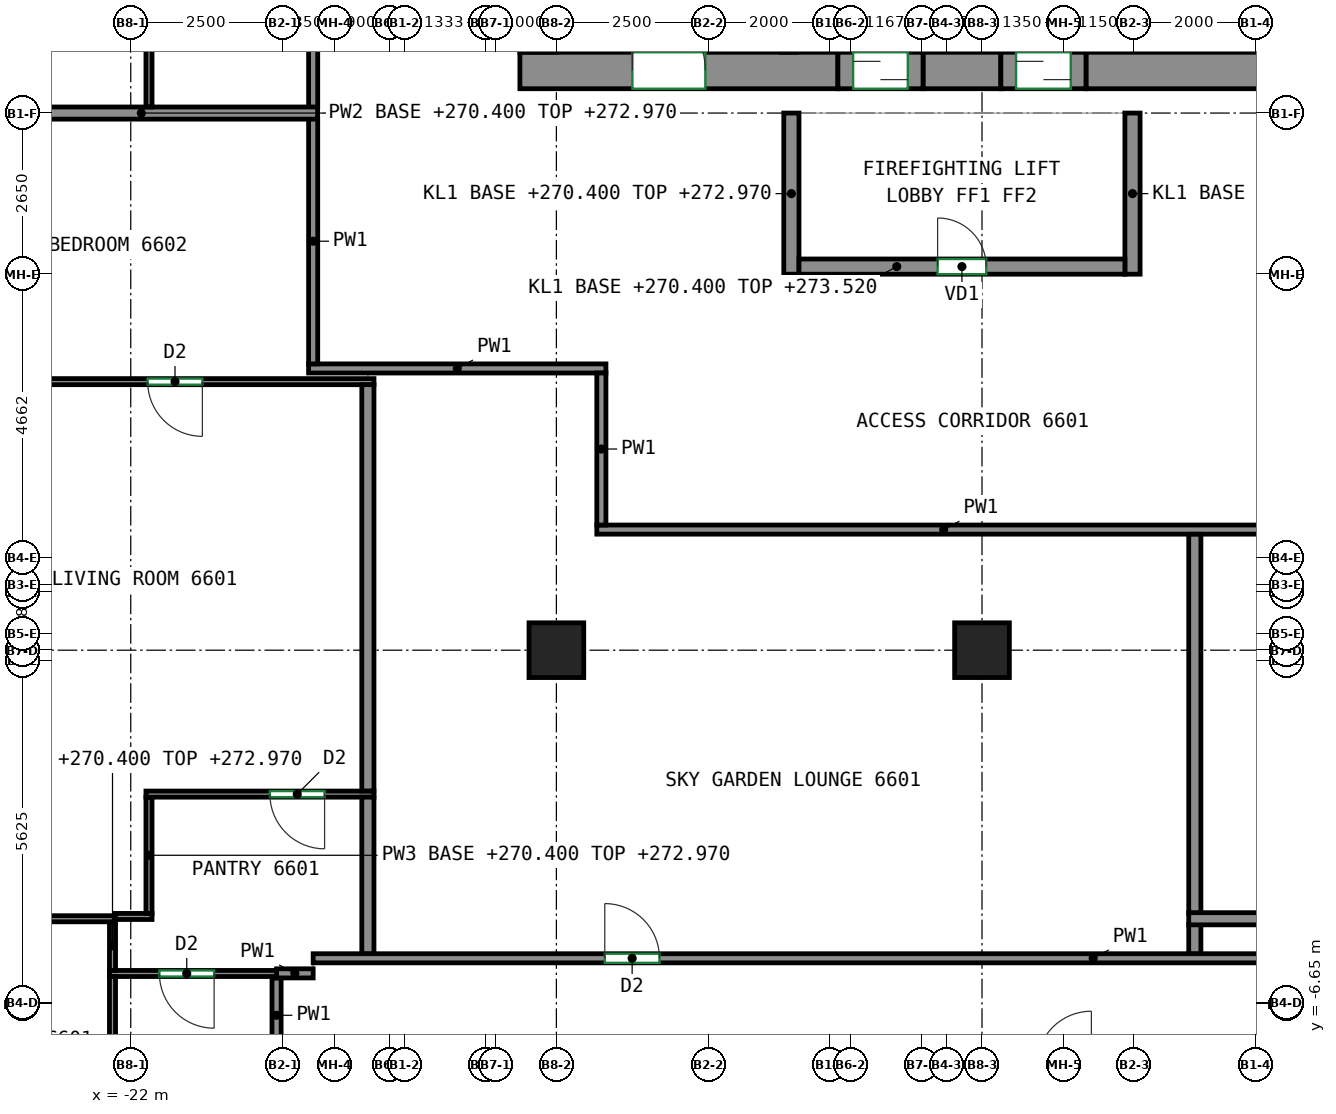
"""IFC4 building model, lengths in metres.
Left out: names, types, materials, properties, quantities, classifications, styles, units other than length and angle.
Written with IfcOpenShell. Run it as: python <this file> out.ifc"""

import sys

from ifc_helpers import new_model, si_unit, direction, frame, frame_2d, origin, origin_2d, place, context, subcontext, project, spatial, rectangle, extrude, source, transform, mapped, element, fill, save


model = new_model("IFC4")
c1 = context("Model", 3, precision=1e-05, world=origin(), true_north=direction((0.0, 1.0)))
c2 = subcontext(c1, "Body", "Model", "MODEL_VIEW")
j1 = project(units=[si_unit("LENGTHUNIT", "METRE"), si_unit("PLANEANGLEUNIT", "RADIAN")], contexts=[c1])
p1 = place(None, origin())
s1 = spatial("IfcSite", under=j1, at=p1, CompositionType="ELEMENT")
p2 = place(p1, origin())
s2 = spatial("IfcBuilding", under=s1, at=p2, CompositionType="ELEMENT")
p3 = place(p2, frame((0.0, 0.0, 270.4)))
s3 = spatial("IfcBuildingStorey", under=s2, at=p3, CompositionType="ELEMENT", Elevation=270.4)
m1 = source(origin(), c2, "Body", "SweptSolid", [
    extrude(rectangle(XDim=0.9, YDim=0.9, at=origin_2d()), origin(), (0.0, 0.0, 1.0), 3.12),
])
for number, where, z_axis, x_axis in (
    (1, (-15.0, -0.833, 0.0), (0.0, 0.0, 1.0), (1.0, 0.0, 0.0)),
    (2, (-8.0, -0.833, 0.0), (0.0, 0.0, 1.0), (1.0, 0.0, 0.0)),
):
    element("IfcColumn", number, at=place(p3, frame(where, z_axis=z_axis, x_axis=x_axis)), inside=s3, PredefinedType="COLUMN", context=c2, shape_type="MappedRepresentation", body=[
        mapped(m1, transform((0.0, 0.0, 0.0))),
    ])
m2 = source(origin(), c2, "Body", "SweptSolid", [
    extrude(rectangle(XDim=5.23, YDim=0.6, at=frame_2d((2.615, 0.0))), origin(), (0.0, 0.0, 1.0), 3.12),
])
p4 = place(p3, frame((-15.6, 8.7, 0.0), z_axis=(0.0, 0.0, 1.0), x_axis=(1.0, 0.0, 0.0)))
e3 = element("IfcWall", 3, at=p4, inside=s3, PredefinedType="SHEAR", context=c2, shape_type="MappedRepresentation", body=[
    mapped(m2, transform((0.0, 0.0, 0.0))),
])
p5 = place(p4, frame((1.85, 0.0, 0.0)))
e4 = element("IfcOpeningElement", 4, at=p5, cuts=e3, PredefinedType="OPENING", context=c2, shape_type="SweptSolid", body=[
    extrude(rectangle(XDim=1.2, YDim=2.1, at=frame_2d((0.6, 1.05))), frame((0.0, 0.31, 0.0), z_axis=(0.0, -1.0, 0.0), x_axis=(1.0, 0.0, 0.0)), (0.0, 0.0, 1.0), 0.62),
])
m3 = source(origin(), c2, "Body", "SweptSolid", [
    extrude(rectangle(XDim=1.28, YDim=0.6, at=frame_2d((0.64, 0.0))), origin(), (0.0, 0.0, 1.0), 3.12),
])
p6 = place(p3, frame((-8.97, 8.7, 0.0), z_axis=(0.0, 0.0, 1.0), x_axis=(1.0, 0.0, 0.0)))
e5 = element("IfcWall", 5, at=p6, inside=s3, PredefinedType="SHEAR", context=c2, shape_type="MappedRepresentation", body=[
    mapped(m3, transform((0.0, 0.0, 0.0))),
])
m4 = source(origin(), c2, "Body", "SweptSolid", [
    extrude(rectangle(XDim=14.18, YDim=0.6, at=frame_2d((7.09, 0.0))), origin(), (0.0, 0.0, 1.0), 3.12),
])
p7 = place(p3, frame((-6.29, 8.7, 0.0), z_axis=(0.0, 0.0, 1.0), x_axis=(1.0, 0.0, 0.0)))
e6 = element("IfcWall", 6, at=p7, inside=s3, PredefinedType="SHEAR", context=c2, shape_type="MappedRepresentation", body=[
    mapped(m4, transform((0.0, 0.0, 0.0))),
])
m5 = source(origin(), c2, "Body", "SweptSolid", [
    extrude(rectangle(XDim=2.65, YDim=0.25, at=frame_2d((1.325, 0.0))), origin(), (0.0, 0.0, 1.0), 2.57),
])
for number, where, z_axis, x_axis in (
    (7, (-11.135, 5.35, 0.0), (0.0, 0.0, 1.0), (0.0, 1.0, 0.0)),
    (8, (-5.525, 5.35, 0.0), (0.0, 0.0, 1.0), (0.0, 1.0, 0.0)),
):
    element("IfcWall", number, at=place(p3, frame(where, z_axis=z_axis, x_axis=x_axis)), inside=s3, PredefinedType="PARTITIONING", context=c2, shape_type="MappedRepresentation", body=[
        mapped(m5, transform((0.0, 0.0, 0.0))),
    ])
m6 = source(origin(), c2, "Body", "SweptSolid", [
    extrude(rectangle(XDim=5.36, YDim=0.25, at=frame_2d((2.68, 0.0))), origin(), (0.0, 0.0, 1.0), 3.12),
])
p8 = place(p3, frame((-11.01, 5.475, 0.0), z_axis=(0.0, 0.0, 1.0), x_axis=(1.0, 0.0, 0.0)))
e9 = element("IfcWall", 9, at=p8, inside=s3, PredefinedType="PARTITIONING", context=c2, shape_type="MappedRepresentation", body=[
    mapped(m6, transform((0.0, 0.0, 0.0))),
])
p9 = place(p8, frame((2.28, 0.0, 0.0)))
e10 = element("IfcOpeningElement", 10, at=p9, cuts=e9, PredefinedType="OPENING", context=c2, shape_type="SweptSolid", body=[
    extrude(rectangle(XDim=0.8, YDim=2.0, at=frame_2d((0.4, 1.0))), frame((0.0, 0.135, 0.0), z_axis=(0.0, -1.0, 0.0), x_axis=(1.0, 0.0, 0.0)), (0.0, 0.0, 1.0), 0.27),
])
m7 = source(origin(), c2, "Body", "SweptSolid", [
    extrude(rectangle(XDim=1.4, YDim=0.6, at=frame_2d((0.7, 0.0))), origin(), (0.0, 0.0, 1.0), 2.7),
])
p10 = place(p3, frame((-10.37, 8.7, 0.0), z_axis=(0.0, 0.0, 1.0), x_axis=(1.0, 0.0, 0.0)))
e11 = element("IfcWall", 11, at=p10, inside=s3, PredefinedType="PARTITIONING", context=c2, shape_type="MappedRepresentation", body=[
    mapped(m7, transform((0.0, 0.0, 0.0))),
])
p11 = place(p10, frame((0.25, 0.0, 0.0)))
e12 = element("IfcOpeningElement", 12, at=p11, cuts=e11, PredefinedType="OPENING", context=c2, shape_type="SweptSolid", body=[
    extrude(rectangle(XDim=0.9, YDim=2.1, at=frame_2d((0.45, 1.05))), frame((0.0, 0.31, 0.0), z_axis=(0.0, -1.0, 0.0), x_axis=(1.0, 0.0, 0.0)), (0.0, 0.0, 1.0), 0.62),
])
m8 = source(origin(), c2, "Body", "SweptSolid", [
    extrude(rectangle(XDim=1.4, YDim=0.6, at=frame_2d((0.7, 0.0))), origin(), (0.0, 0.0, 1.0), 2.7),
])
p12 = place(p3, frame((-7.69, 8.7, 0.0), z_axis=(0.0, 0.0, 1.0), x_axis=(1.0, 0.0, 0.0)))
e13 = element("IfcWall", 13, at=p12, inside=s3, PredefinedType="PARTITIONING", context=c2, shape_type="MappedRepresentation", body=[
    mapped(m8, transform((0.0, 0.0, 0.0))),
])
p13 = place(p12, frame((0.25, 0.0, 0.0)))
e14 = element("IfcOpeningElement", 14, at=p13, cuts=e13, PredefinedType="OPENING", context=c2, shape_type="SweptSolid", body=[
    extrude(rectangle(XDim=0.9, YDim=2.1, at=frame_2d((0.45, 1.05))), frame((0.0, 0.31, 0.0), z_axis=(0.0, -1.0, 0.0), x_axis=(1.0, 0.0, 0.0)), (0.0, 0.0, 1.0), 0.62),
])
p14 = place(p3, frame((-19.602, -7.452, 0.0), z_axis=(0.0, 0.0, 1.0), x_axis=(0.0, 1.0, 0.0)))
e15 = element("IfcWall", 15, at=p14, inside=s3, PredefinedType="PARTITIONING", context=c2, shape_type="SweptSolid", body=[
    extrude(rectangle(XDim=1.229, YDim=0.15, at=frame_2d((0.615, 0.0))), origin(), (0.0, 0.0, 1.0), 3.12),
])
p15 = place(p3, frame((-19.0, -6.148, 0.0), z_axis=(0.0, 0.0, 1.0), x_axis=(-1.0, 0.0, 0.0)))
e16 = element("IfcWall", 16, at=p15, inside=s3, PredefinedType="PARTITIONING", context=c2, shape_type="SweptSolid", body=[
    extrude(rectangle(XDim=0.602, YDim=0.15, at=frame_2d((0.301, 0.0))), origin(), (0.0, 0.0, 1.0), 3.12),
])
p16 = place(p3, frame((-19.0, -5.9, 0.0), z_axis=(0.0, 0.0, 1.0), x_axis=(1.0, 0.0, 0.0)))
e17 = element("IfcWall", 17, at=p16, inside=s3, PredefinedType="PARTITIONING", context=c2, shape_type="SweptSolid", body=[
    extrude(rectangle(XDim=25.655, YDim=0.15, at=frame_2d((12.828, 0.0))), origin(), (0.0, 0.0, 1.0), 3.12),
])
p17 = place(p16, frame((4.796, 0.0, 0.0)))
e18 = element("IfcOpeningElement", 18, at=p17, cuts=e17, PredefinedType="OPENING", context=c2, shape_type="SweptSolid", body=[
    extrude(rectangle(XDim=0.9, YDim=2.1, at=frame_2d((0.45, 1.05))), frame((0.0, 0.085, 0.0), z_axis=(0.0, -1.0, 0.0), x_axis=(1.0, 0.0, 0.0)), (0.0, 0.0, 1.0), 0.17),
])
p18 = place(p16, frame((21.535, 0.0, 0.0)))
e19 = element("IfcOpeningElement", 19, at=p18, cuts=e17, PredefinedType="OPENING", context=c2, shape_type="SweptSolid", body=[
    extrude(rectangle(XDim=0.9, YDim=2.1, at=frame_2d((0.45, 1.05))), frame((0.0, 0.085, 0.0), z_axis=(0.0, -1.0, 0.0), x_axis=(1.0, 0.0, 0.0)), (0.0, 0.0, 1.0), 0.17),
])
p19 = place(p3, frame((-19.075, 3.8, 0.0), z_axis=(0.0, 0.0, 1.0), x_axis=(1.0, 0.0, 0.0)))
e20 = element("IfcWall", 20, at=p19, inside=s3, PredefinedType="PARTITIONING", context=c2, shape_type="SweptSolid", body=[
    extrude(rectangle(XDim=4.89, YDim=0.15, at=frame_2d((2.445, 0.0))), origin(), (0.0, 0.0, 1.0), 3.12),
])
p20 = place(p3, frame((-19.0, 3.875, 0.0), z_axis=(0.0, 0.0, 1.0), x_axis=(0.0, 1.0, 0.0)))
e21 = element("IfcWall", 21, at=p20, inside=s3, PredefinedType="PARTITIONING", context=c2, shape_type="SweptSolid", body=[
    extrude(rectangle(XDim=4.035, YDim=0.15, at=frame_2d((2.018, 0.0))), origin(), (0.0, 0.0, 1.0), 3.12),
])
p21 = place(p3, frame((-19.0, 8.09, 0.0), z_axis=(0.0, 0.0, 1.0), x_axis=(0.0, 1.0, 0.0)))
e22 = element("IfcWall", 22, at=p21, inside=s3, PredefinedType="PARTITIONING", context=c2, shape_type="SweptSolid", body=[
    extrude(rectangle(XDim=4.63, YDim=0.15, at=frame_2d((2.315, 0.0))), origin(), (0.0, 0.0, 1.0), 3.12),
])
p22 = place(p3, frame((-14.335, 1.15, 0.0), z_axis=(0.0, 0.0, 1.0), x_axis=(1.0, 0.0, 0.0)))
e23 = element("IfcWall", 23, at=p22, inside=s3, PredefinedType="PARTITIONING", context=c2, shape_type="SweptSolid", body=[
    extrude(rectangle(XDim=11.41, YDim=0.15, at=frame_2d((5.705, 0.0))), origin(), (0.0, 0.0, 1.0), 3.12),
])
p23 = place(p3, frame((-14.26, 3.725, 0.0), z_axis=(0.0, 0.0, 1.0), x_axis=(0.0, -1.0, 0.0)))
e24 = element("IfcWall", 24, at=p23, inside=s3, PredefinedType="PARTITIONING", context=c2, shape_type="SweptSolid", body=[
    extrude(rectangle(XDim=2.5, YDim=0.15, at=frame_2d((1.25, 0.0))), origin(), (0.0, 0.0, 1.0), 3.12),
])
p24 = place(p3, frame((-19.602, -6.15, 0.0), z_axis=(0.0, 0.0, 1.0), x_axis=(-1.0, 0.0, 0.0)))
e25 = element("IfcWall", 25, at=p24, inside=s3, PredefinedType="PARTITIONING", context=c2, shape_type="SweptSolid", body=[
    extrude(rectangle(XDim=2.748, YDim=0.1, at=frame_2d((1.374, 0.0))), origin(), (0.0, 0.0, 1.0), 3.12),
])
p25 = place(p24, frame((1.027, 0.0, 0.0)))
e26 = element("IfcOpeningElement", 26, at=p25, cuts=e25, PredefinedType="OPENING", context=c2, shape_type="SweptSolid", body=[
    extrude(rectangle(XDim=0.9, YDim=2.1, at=frame_2d((0.45, 1.05))), frame((0.0, 0.06, 0.0), z_axis=(0.0, -1.0, 0.0), x_axis=(1.0, 0.0, 0.0)), (0.0, 0.0, 1.0), 0.12),
])
p26 = place(p3, frame((-22.3, -9.05, 0.0), z_axis=(0.0, 0.0, 1.0), x_axis=(0.0, 1.0, 0.0)))
e27 = element("IfcWall", 27, at=p26, inside=s3, PredefinedType="PARTITIONING", context=c2, shape_type="SweptSolid", body=[
    extrude(rectangle(XDim=2.85, YDim=0.1, at=frame_2d((1.425, 0.0))), origin(), (0.0, 0.0, 1.0), 2.57),
])
p27 = place(p3, frame((-22.3, -6.1, 0.0), z_axis=(0.0, 0.0, 1.0), x_axis=(0.0, 1.0, 0.0)))
e28 = element("IfcWall", 28, at=p27, inside=s3, PredefinedType="PARTITIONING", context=c2, shape_type="SweptSolid", body=[
    extrude(rectangle(XDim=0.81, YDim=0.1, at=frame_2d((0.405, 0.0))), origin(), (0.0, 0.0, 1.0), 2.57),
])
p28 = place(p3, frame((-21.65, -5.212, 0.0), z_axis=(0.0, 0.0, 1.0), x_axis=(-1.0, 0.0, 0.0)))
e29 = element("IfcWall", 29, at=p28, inside=s3, PredefinedType="PARTITIONING", context=c2, shape_type="SweptSolid", body=[
    extrude(rectangle(XDim=0.602, YDim=0.1, at=frame_2d((0.301, 0.0))), origin(), (0.0, 0.0, 1.0), 3.12),
])
p29 = place(p3, frame((-21.7, -5.162, 0.0), z_axis=(0.0, 0.0, 1.0), x_axis=(0.0, 1.0, 0.0)))
e30 = element("IfcWall", 30, at=p29, inside=s3, PredefinedType="PARTITIONING", context=c2, shape_type="SweptSolid", body=[
    extrude(rectangle(XDim=1.912, YDim=0.1, at=frame_2d((0.956, 0.0))), origin(), (0.0, 0.0, 1.0), 2.57),
])
p30 = place(p3, frame((-18.0, -3.2, 0.0), z_axis=(0.0, 0.0, 1.0), x_axis=(-1.0, 0.0, 0.0)))
e31 = element("IfcWall", 31, at=p30, inside=s3, PredefinedType="PARTITIONING", context=c2, shape_type="SweptSolid", body=[
    extrude(rectangle(XDim=3.75, YDim=0.1, at=frame_2d((1.875, 0.0))), origin(), (0.0, 0.0, 1.0), 3.12),
])
p31 = place(p30, frame((0.812, 0.0, 0.0)))
e32 = element("IfcOpeningElement", 32, at=p31, cuts=e31, PredefinedType="OPENING", context=c2, shape_type="SweptSolid", body=[
    extrude(rectangle(XDim=0.9, YDim=2.1, at=frame_2d((0.45, 1.05))), frame((0.0, 0.06, 0.0), z_axis=(0.0, -1.0, 0.0), x_axis=(1.0, 0.0, 0.0)), (0.0, 0.0, 1.0), 0.12),
])
p32 = place(p3, frame((-18.1, -5.823, 0.0), z_axis=(0.0, 0.0, 1.0), x_axis=(0.0, 1.0, 0.0)))
e33 = element("IfcWall", 33, at=p32, inside=s3, PredefinedType="PARTITIONING", context=c2, shape_type="SweptSolid", body=[
    extrude(rectangle(XDim=2.573, YDim=0.2, at=frame_2d((1.287, 0.0))), origin(), (0.0, 0.0, 1.0), 3.12),
])
p33 = place(p3, frame((-22.252, -5.25, 0.0), z_axis=(0.0, 0.0, 1.0), x_axis=(-1.0, 0.0, 0.0)))
e34 = element("IfcWall", 34, at=p33, inside=s3, PredefinedType="PARTITIONING", context=c2, shape_type="SweptSolid", body=[
    extrude(rectangle(XDim=2.998, YDim=0.1, at=frame_2d((1.499, 0.0))), origin(), (0.0, 0.0, 1.0), 3.12),
])
p34 = place(p33, frame((1.898, 0.0, 0.0)))
e35 = element("IfcOpeningElement", 35, at=p34, cuts=e34, PredefinedType="OPENING", context=c2, shape_type="SweptSolid", body=[
    extrude(rectangle(XDim=0.9, YDim=2.1, at=frame_2d((0.45, 1.05))), frame((0.0, 0.06, 0.0), z_axis=(0.0, -1.0, 0.0), x_axis=(1.0, 0.0, 0.0)), (0.0, 0.0, 1.0), 0.12),
])
p35 = place(p3, frame((-18.0, 3.583, 0.0), z_axis=(0.0, 0.0, 1.0), x_axis=(-1.0, 0.0, 0.0)))
e36 = element("IfcWall", 36, at=p35, inside=s3, PredefinedType="PARTITIONING", context=c2, shape_type="SweptSolid", body=[
    extrude(rectangle(XDim=7.25, YDim=0.1, at=frame_2d((3.625, 0.0))), origin(), (0.0, 0.0, 1.0), 3.12),
])
p36 = place(p35, frame((2.822, 0.0, 0.0)))
e37 = element("IfcOpeningElement", 37, at=p36, cuts=e36, PredefinedType="OPENING", context=c2, shape_type="SweptSolid", body=[
    extrude(rectangle(XDim=0.9, YDim=2.1, at=frame_2d((0.45, 1.05))), frame((0.0, 0.06, 0.0), z_axis=(0.0, -1.0, 0.0), x_axis=(1.0, 0.0, 0.0)), (0.0, 0.0, 1.0), 0.12),
])
p37 = place(p3, frame((-18.1, -3.148, 0.0), z_axis=(0.0, 0.0, 1.0), x_axis=(0.0, 1.0, 0.0)))
e38 = element("IfcWall", 38, at=p37, inside=s3, PredefinedType="PARTITIONING", context=c2, shape_type="SweptSolid", body=[
    extrude(rectangle(XDim=6.681, YDim=0.2, at=frame_2d((3.34, 0.0))), origin(), (0.0, 0.0, 1.0), 3.12),
])
p38 = place(p3, frame((-24.725, 8.0, 0.0), z_axis=(0.0, 0.0, 1.0), x_axis=(1.0, 0.0, 0.0)))
e39 = element("IfcWall", 39, at=p38, inside=s3, PredefinedType="PARTITIONING", context=c2, shape_type="SweptSolid", body=[
    extrude(rectangle(XDim=5.798, YDim=0.2, at=frame_2d((2.899, 0.0))), origin(), (0.0, 0.0, 1.0), 2.57),
])
p39 = place(p3, frame((-21.7, 8.1, 0.0), z_axis=(0.0, 0.0, 1.0), x_axis=(0.0, 1.0, 0.0)))
e40 = element("IfcWall", 40, at=p39, inside=s3, PredefinedType="PARTITIONING", context=c2, shape_type="SweptSolid", body=[
    extrude(rectangle(XDim=2.619, YDim=0.1, at=frame_2d((1.31, 0.0))), origin(), (0.0, 0.0, 1.0), 2.57),
])
p40 = place(p3, frame((-4.5, -5.16, 0.0), z_axis=(0.0, 0.0, 1.0), x_axis=(0.0, 1.0, 0.0)))
e41 = element("IfcWall", 41, at=p40, inside=s3, PredefinedType="PARTITIONING", context=c2, shape_type="SweptSolid", body=[
    extrude(rectangle(XDim=6.233, YDim=0.2, at=frame_2d((3.116, 0.0))), origin(), (0.0, 0.0, 1.0), 3.12),
])
p41 = place(p3, frame((-4.5, -5.823, 0.0), z_axis=(0.0, 0.0, 1.0), x_axis=(0.0, 1.0, 0.0)))
e42 = element("IfcWall", 42, at=p41, inside=s3, PredefinedType="PARTITIONING", context=c2, shape_type="SweptSolid", body=[
    extrude(rectangle(XDim=0.483, YDim=0.2, at=frame_2d((0.241, 0.0))), origin(), (0.0, 0.0, 1.0), 3.12),
])
p42 = place(p3, frame((-4.6, -5.25, 0.0), z_axis=(0.0, 0.0, 1.0), x_axis=(1.0, 0.0, 0.0)))
e43 = element("IfcWall", 43, at=p42, inside=s3, PredefinedType="PARTITIONING", context=c2, shape_type="SweptSolid", body=[
    extrude(rectangle(XDim=7.2, YDim=0.2, at=frame_2d((3.6, 0.0))), origin(), (0.0, 0.0, 1.0), 3.12),
])
p43 = place(p9, origin())
e44 = element("IfcDoor", 44, at=p43, inside=s3, OperationType="SINGLE_SWING_LEFT", PredefinedType="DOOR", context=c2, shape_type="SweptSolid", body=[
    extrude(rectangle(XDim=0.8, YDim=2.0, at=frame_2d((0.4, 1.0))), frame((0.0, 0.025, 0.0), z_axis=(0.0, -1.0, 0.0), x_axis=(1.0, 0.0, 0.0)), (0.0, 0.0, 1.0), 0.05),
])
fill(e10, e44)
p44 = place(p11, origin())
e45 = element("IfcDoor", 45, at=p44, inside=s3, OperationType="SLIDING_TO_LEFT", PredefinedType="DOOR", context=c2, shape_type="SweptSolid", body=[
    extrude(rectangle(XDim=0.9, YDim=2.1, at=frame_2d((0.45, 1.05))), frame((0.0, 0.205, 0.0), z_axis=(0.0, -1.0, 0.0), x_axis=(1.0, 0.0, 0.0)), (0.0, 0.0, 1.0), 0.05),
])
fill(e12, e45)
p45 = place(p13, origin())
e46 = element("IfcDoor", 46, at=p45, inside=s3, OperationType="SLIDING_TO_RIGHT", PredefinedType="DOOR", context=c2, shape_type="SweptSolid", body=[
    extrude(rectangle(XDim=0.9, YDim=2.1, at=frame_2d((0.45, 1.05))), frame((0.0, 0.205, 0.0), z_axis=(0.0, -1.0, 0.0), x_axis=(1.0, 0.0, 0.0)), (0.0, 0.0, 1.0), 0.05),
])
fill(e14, e46)
p46 = place(p5, origin())
e47 = element("IfcDoor", 47, at=p46, inside=s3, OperationType="DOUBLE_DOOR_SINGLE_SWING", PredefinedType="DOOR", context=c2, shape_type="SweptSolid", body=[
    extrude(rectangle(XDim=1.2, YDim=2.1, at=frame_2d((0.6, 1.05))), frame((0.0, 0.205, 0.0), z_axis=(0.0, -1.0, 0.0), x_axis=(1.0, 0.0, 0.0)), (0.0, 0.0, 1.0), 0.05),
])
fill(e4, e47)
p47 = place(p25, origin())
e48 = element("IfcDoor", 48, at=p47, inside=s3, OperationType="SINGLE_SWING_LEFT", PredefinedType="DOOR", context=c2, shape_type="SweptSolid", body=[
    extrude(rectangle(XDim=0.9, YDim=2.1, at=frame_2d((0.45, 1.05))), frame((0.0, 0.025, 0.0), z_axis=(0.0, -1.0, 0.0), x_axis=(1.0, 0.0, 0.0)), (0.0, 0.0, 1.0), 0.05),
])
fill(e26, e48)
p48 = place(p17, origin())
e49 = element("IfcDoor", 49, at=p48, inside=s3, OperationType="SINGLE_SWING_LEFT", PredefinedType="DOOR", context=c2, shape_type="SweptSolid", body=[
    extrude(rectangle(XDim=0.9, YDim=2.1, at=frame_2d((0.45, 1.05))), frame((0.0, 0.025, 0.0), z_axis=(0.0, -1.0, 0.0), x_axis=(1.0, 0.0, 0.0)), (0.0, 0.0, 1.0), 0.05),
])
fill(e18, e49)
p49 = place(p31, origin())
e50 = element("IfcDoor", 50, at=p49, inside=s3, OperationType="SINGLE_SWING_LEFT", PredefinedType="DOOR", context=c2, shape_type="SweptSolid", body=[
    extrude(rectangle(XDim=0.9, YDim=2.1, at=frame_2d((0.45, 1.05))), frame((0.0, 0.025, 0.0), z_axis=(0.0, -1.0, 0.0), x_axis=(1.0, 0.0, 0.0)), (0.0, 0.0, 1.0), 0.05),
])
fill(e32, e50)
p50 = place(p36, origin())
e51 = element("IfcDoor", 51, at=p50, inside=s3, OperationType="SINGLE_SWING_LEFT", PredefinedType="DOOR", context=c2, shape_type="SweptSolid", body=[
    extrude(rectangle(XDim=0.9, YDim=2.1, at=frame_2d((0.45, 1.05))), frame((0.0, 0.025, 0.0), z_axis=(0.0, -1.0, 0.0), x_axis=(1.0, 0.0, 0.0)), (0.0, 0.0, 1.0), 0.05),
])
fill(e37, e51)
save(model, sys.argv[1])
